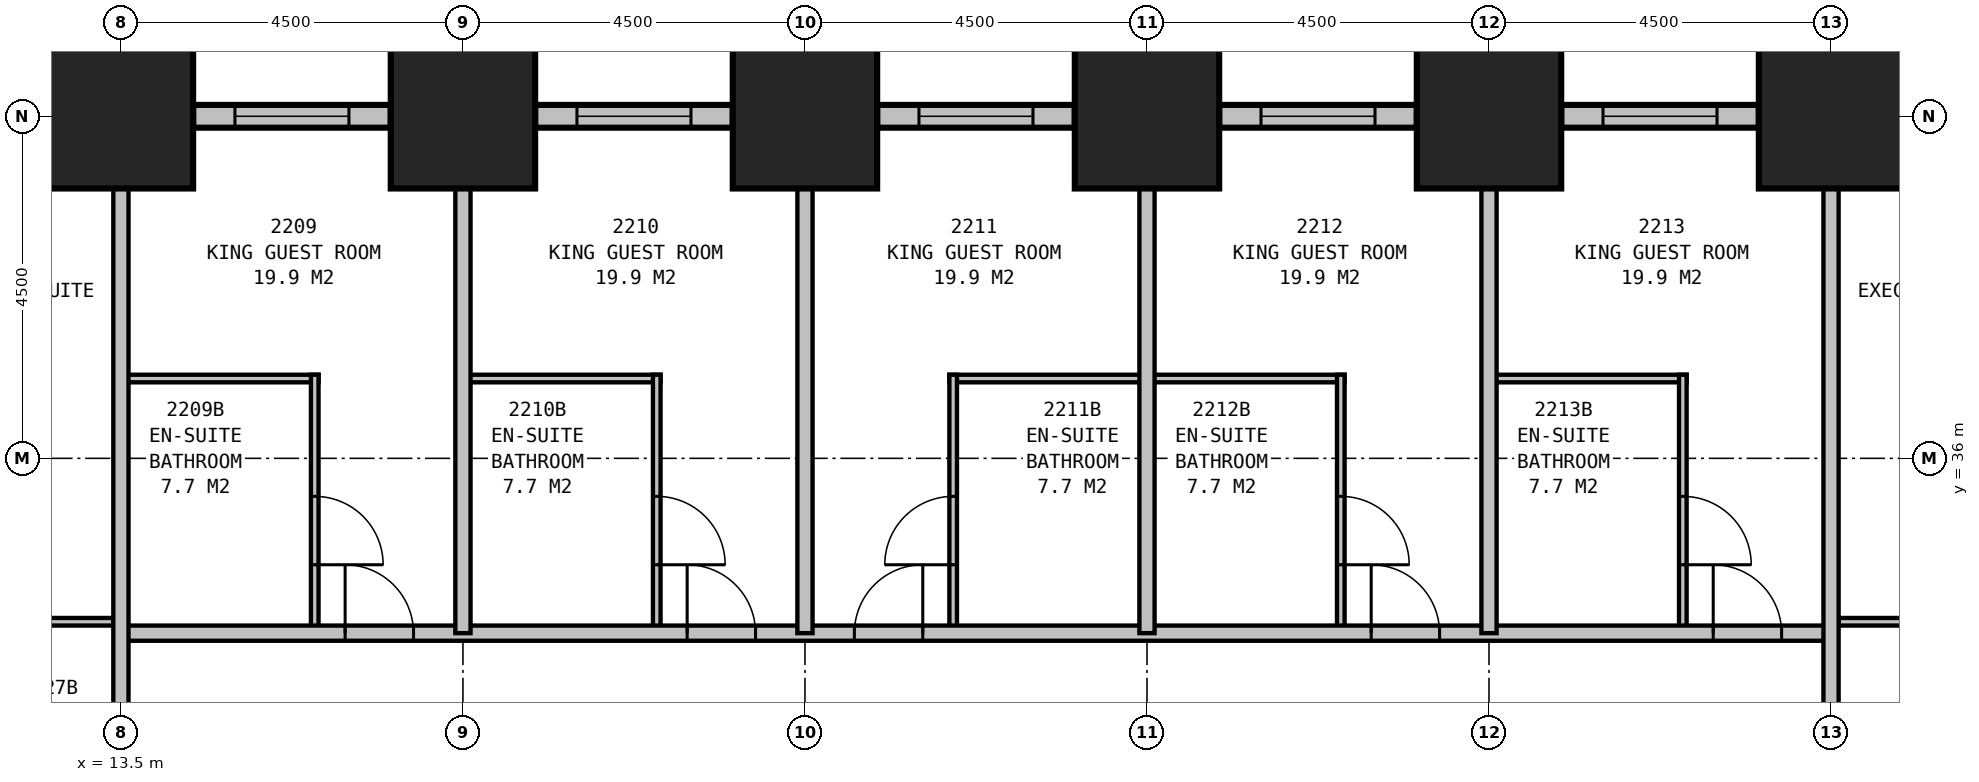
"""IFC4 building model, lengths in metres.
Left out: names, types, materials, properties, quantities, classifications, styles, units other than length and angle.
Written with IfcOpenShell. Run it as: python <this file> out.ifc"""

import sys

from ifc_helpers import new_model, si_unit, direction, frame, frame_2d, origin, origin_2d, place, context, subcontext, project, spatial, rectangle, extrude, element, fill, save


model = new_model("IFC4")
c1 = context("Model", 3, precision=1e-05, world=origin(), true_north=direction((0.0, 1.0)))
c2 = subcontext(c1, "Body", "Model", "MODEL_VIEW")
j1 = project(units=[si_unit("LENGTHUNIT", "METRE"), si_unit("PLANEANGLEUNIT", "RADIAN")], contexts=[c1])
p1 = place(None, origin())
s1 = spatial("IfcSite", under=j1, at=p1, CompositionType="ELEMENT")
p2 = place(p1, origin())
s2 = spatial("IfcBuilding", under=s1, at=p2, CompositionType="ELEMENT")
p3 = place(p2, frame((0.0, 0.0, 89.9)))
s3 = spatial("IfcBuildingStorey", under=s2, at=p3, CompositionType="ELEMENT", Elevation=89.9)
for number, where, z_axis, x_axis in (
    (1, (36.0, 40.5, 0.0), (0.0, 0.0, 1.0), (1.0, 0.0, 0.0)),
    (2, (31.5, 40.5, 0.0), (0.0, 0.0, 1.0), (1.0, 0.0, 0.0)),
    (3, (27.0, 40.5, 0.0), (0.0, 0.0, 1.0), (1.0, 0.0, 0.0)),
    (4, (22.5, 40.5, 0.0), (0.0, 0.0, 1.0), (1.0, 0.0, 0.0)),
    (5, (18.0, 40.5, 0.0), (0.0, 0.0, 1.0), (1.0, 0.0, 0.0)),
    (6, (13.5, 40.5, 0.0), (0.0, 0.0, 1.0), (1.0, 0.0, 0.0)),
):
    element("IfcColumn", number, at=place(p3, frame(where, z_axis=z_axis, x_axis=x_axis)), inside=s3, PredefinedType="COLUMN", context=c2, shape_type="SweptSolid", body=[
        extrude(rectangle(XDim=1.9, YDim=1.9, at=origin_2d()), origin(), (0.0, 0.0, 1.0), 3.5),
    ])
p4 = place(p3, frame((35.05, 40.5, 0.0), z_axis=(0.0, 0.0, 1.0), x_axis=(-1.0, 0.0, 0.0)))
e7 = element("IfcWall", 7, at=p4, inside=s3, PredefinedType="STANDARD", context=c2, shape_type="SweptSolid", body=[
    extrude(rectangle(XDim=2.6, YDim=0.3, at=frame_2d((1.3, 0.0))), origin(), (0.0, 0.0, 1.0), 2.15),
])
p5 = place(p4, frame((0.55, 0.0, 0.5)))
e8 = element("IfcOpeningElement", 8, at=p5, cuts=e7, PredefinedType="OPENING", context=c2, shape_type="SweptSolid", body=[
    extrude(rectangle(XDim=1.5, YDim=1.5, at=frame_2d((0.75, 0.75))), frame((0.0, 0.16, 0.0), z_axis=(0.0, -1.0, 0.0), x_axis=(1.0, 0.0, 0.0)), (0.0, 0.0, 1.0), 0.32),
])
p6 = place(p3, frame((30.55, 40.5, 0.0), z_axis=(0.0, 0.0, 1.0), x_axis=(-1.0, 0.0, 0.0)))
e9 = element("IfcWall", 9, at=p6, inside=s3, PredefinedType="STANDARD", context=c2, shape_type="SweptSolid", body=[
    extrude(rectangle(XDim=2.6, YDim=0.3, at=frame_2d((1.3, 0.0))), origin(), (0.0, 0.0, 1.0), 2.15),
])
p7 = place(p6, frame((0.55, 0.0, 0.5)))
e10 = element("IfcOpeningElement", 10, at=p7, cuts=e9, PredefinedType="OPENING", context=c2, shape_type="SweptSolid", body=[
    extrude(rectangle(XDim=1.5, YDim=1.5, at=frame_2d((0.75, 0.75))), frame((0.0, 0.16, 0.0), z_axis=(0.0, -1.0, 0.0), x_axis=(1.0, 0.0, 0.0)), (0.0, 0.0, 1.0), 0.32),
])
p8 = place(p3, frame((26.05, 40.5, 0.0), z_axis=(0.0, 0.0, 1.0), x_axis=(-1.0, 0.0, 0.0)))
e11 = element("IfcWall", 11, at=p8, inside=s3, PredefinedType="STANDARD", context=c2, shape_type="SweptSolid", body=[
    extrude(rectangle(XDim=2.6, YDim=0.3, at=frame_2d((1.3, 0.0))), origin(), (0.0, 0.0, 1.0), 2.15),
])
p9 = place(p8, frame((0.55, 0.0, 0.5)))
e12 = element("IfcOpeningElement", 12, at=p9, cuts=e11, PredefinedType="OPENING", context=c2, shape_type="SweptSolid", body=[
    extrude(rectangle(XDim=1.5, YDim=1.5, at=frame_2d((0.75, 0.75))), frame((0.0, 0.16, 0.0), z_axis=(0.0, -1.0, 0.0), x_axis=(1.0, 0.0, 0.0)), (0.0, 0.0, 1.0), 0.32),
])
p10 = place(p3, frame((21.55, 40.5, 0.0), z_axis=(0.0, 0.0, 1.0), x_axis=(-1.0, 0.0, 0.0)))
e13 = element("IfcWall", 13, at=p10, inside=s3, PredefinedType="STANDARD", context=c2, shape_type="SweptSolid", body=[
    extrude(rectangle(XDim=2.6, YDim=0.3, at=frame_2d((1.3, 0.0))), origin(), (0.0, 0.0, 1.0), 2.15),
])
p11 = place(p10, frame((0.55, 0.0, 0.5)))
e14 = element("IfcOpeningElement", 14, at=p11, cuts=e13, PredefinedType="OPENING", context=c2, shape_type="SweptSolid", body=[
    extrude(rectangle(XDim=1.5, YDim=1.5, at=frame_2d((0.75, 0.75))), frame((0.0, 0.16, 0.0), z_axis=(0.0, -1.0, 0.0), x_axis=(1.0, 0.0, 0.0)), (0.0, 0.0, 1.0), 0.32),
])
p12 = place(p3, frame((17.05, 40.5, 0.0), z_axis=(0.0, 0.0, 1.0), x_axis=(-1.0, 0.0, 0.0)))
e15 = element("IfcWall", 15, at=p12, inside=s3, PredefinedType="STANDARD", context=c2, shape_type="SweptSolid", body=[
    extrude(rectangle(XDim=2.6, YDim=0.3, at=frame_2d((1.3, 0.0))), origin(), (0.0, 0.0, 1.0), 2.15),
])
p13 = place(p12, frame((0.55, 0.0, 0.5)))
e16 = element("IfcOpeningElement", 16, at=p13, cuts=e15, PredefinedType="OPENING", context=c2, shape_type="SweptSolid", body=[
    extrude(rectangle(XDim=1.5, YDim=1.5, at=frame_2d((0.75, 0.75))), frame((0.0, 0.16, 0.0), z_axis=(0.0, -1.0, 0.0), x_axis=(1.0, 0.0, 0.0)), (0.0, 0.0, 1.0), 0.32),
])
p14 = place(p3, frame((13.5, 33.7, 0.0), z_axis=(0.0, 0.0, 1.0), x_axis=(1.0, 0.0, 0.0)))
e17 = element("IfcWall", 17, at=p14, inside=s3, PredefinedType="PARTITIONING", context=c2, shape_type="SweptSolid", body=[
    extrude(rectangle(XDim=22.5, YDim=0.2, at=frame_2d((11.25, 0.0))), origin(), (0.0, 0.0, 1.0), 3.25),
])
p15 = place(p14, frame((2.95, 0.0, 0.0)))
e18 = element("IfcOpeningElement", 18, at=p15, cuts=e17, PredefinedType="OPENING", context=c2, shape_type="SweptSolid", body=[
    extrude(rectangle(XDim=0.9, YDim=2.1, at=frame_2d((0.45, 1.05))), frame((0.0, 0.11, 0.0), z_axis=(0.0, -1.0, 0.0), x_axis=(1.0, 0.0, 0.0)), (0.0, 0.0, 1.0), 0.22),
])
p16 = place(p14, frame((7.45, 0.0, 0.0)))
e19 = element("IfcOpeningElement", 19, at=p16, cuts=e17, PredefinedType="OPENING", context=c2, shape_type="SweptSolid", body=[
    extrude(rectangle(XDim=0.9, YDim=2.1, at=frame_2d((0.45, 1.05))), frame((0.0, 0.11, 0.0), z_axis=(0.0, -1.0, 0.0), x_axis=(1.0, 0.0, 0.0)), (0.0, 0.0, 1.0), 0.22),
])
p17 = place(p14, frame((9.65, 0.0, 0.0)))
e20 = element("IfcOpeningElement", 20, at=p17, cuts=e17, PredefinedType="OPENING", context=c2, shape_type="SweptSolid", body=[
    extrude(rectangle(XDim=0.9, YDim=2.1, at=frame_2d((0.45, 1.05))), frame((0.0, 0.11, 0.0), z_axis=(0.0, -1.0, 0.0), x_axis=(1.0, 0.0, 0.0)), (0.0, 0.0, 1.0), 0.22),
])
p18 = place(p14, frame((16.45, 0.0, 0.0)))
e21 = element("IfcOpeningElement", 21, at=p18, cuts=e17, PredefinedType="OPENING", context=c2, shape_type="SweptSolid", body=[
    extrude(rectangle(XDim=0.9, YDim=2.1, at=frame_2d((0.45, 1.05))), frame((0.0, 0.11, 0.0), z_axis=(0.0, -1.0, 0.0), x_axis=(1.0, 0.0, 0.0)), (0.0, 0.0, 1.0), 0.22),
])
p19 = place(p14, frame((20.95, 0.0, 0.0)))
e22 = element("IfcOpeningElement", 22, at=p19, cuts=e17, PredefinedType="OPENING", context=c2, shape_type="SweptSolid", body=[
    extrude(rectangle(XDim=0.9, YDim=2.1, at=frame_2d((0.45, 1.05))), frame((0.0, 0.11, 0.0), z_axis=(0.0, -1.0, 0.0), x_axis=(1.0, 0.0, 0.0)), (0.0, 0.0, 1.0), 0.22),
])
for number, where, z_axis, x_axis in (
    (23, (18.0, 33.7, 0.0), (0.0, 0.0, 1.0), (0.0, 1.0, 0.0)),
    (24, (22.5, 33.7, 0.0), (0.0, 0.0, 1.0), (0.0, 1.0, 0.0)),
    (25, (27.0, 33.7, 0.0), (0.0, 0.0, 1.0), (0.0, 1.0, 0.0)),
    (26, (31.5, 33.7, 0.0), (0.0, 0.0, 1.0), (0.0, 1.0, 0.0)),
):
    element("IfcWall", number, at=place(p3, frame(where, z_axis=z_axis, x_axis=x_axis)), inside=s3, PredefinedType="PARTITIONING", context=c2, shape_type="SweptSolid", body=[
        extrude(rectangle(XDim=6.8, YDim=0.2, at=frame_2d((3.4, 0.0))), origin(), (0.0, 0.0, 1.0), 2.25),
    ])
p20 = place(p3, frame((13.5, 37.05, 0.0), z_axis=(0.0, 0.0, 1.0), x_axis=(1.0, 0.0, 0.0)))
e27 = element("IfcWall", 27, at=p20, inside=s3, PredefinedType="PLUMBINGWALL", context=c2, shape_type="SweptSolid", body=[
    extrude(rectangle(XDim=2.6, YDim=0.1, at=frame_2d((1.3, 0.0))), origin(), (0.0, 0.0, 1.0), 3.25),
])
p21 = place(p3, frame((16.05, 33.7, 0.0), z_axis=(0.0, 0.0, 1.0), x_axis=(0.0, 1.0, 0.0)))
e28 = element("IfcWall", 28, at=p21, inside=s3, PredefinedType="PLUMBINGWALL", context=c2, shape_type="SweptSolid", body=[
    extrude(rectangle(XDim=3.4, YDim=0.1, at=frame_2d((1.7, 0.0))), origin(), (0.0, 0.0, 1.0), 3.25),
])
p22 = place(p21, frame((1.8, 0.0, 0.0), z_axis=(0.0, 0.0, 1.0), x_axis=(-1.0, 0.0, 0.0)))
e29 = element("IfcOpeningElement", 29, at=p22, cuts=e28, PredefinedType="OPENING", context=c2, shape_type="SweptSolid", body=[
    extrude(rectangle(XDim=0.9, YDim=2.1, at=frame_2d((0.45, 1.05))), frame((0.0, 0.06, 0.0), z_axis=(0.0, -1.0, 0.0), x_axis=(1.0, 0.0, 0.0)), (0.0, 0.0, 1.0), 0.12),
])
p23 = place(p3, frame((18.0, 37.05, 0.0), z_axis=(0.0, 0.0, 1.0), x_axis=(1.0, 0.0, 0.0)))
e30 = element("IfcWall", 30, at=p23, inside=s3, PredefinedType="PLUMBINGWALL", context=c2, shape_type="SweptSolid", body=[
    extrude(rectangle(XDim=2.6, YDim=0.1, at=frame_2d((1.3, 0.0))), origin(), (0.0, 0.0, 1.0), 3.25),
])
p24 = place(p3, frame((20.55, 33.7, 0.0), z_axis=(0.0, 0.0, 1.0), x_axis=(0.0, 1.0, 0.0)))
e31 = element("IfcWall", 31, at=p24, inside=s3, PredefinedType="PLUMBINGWALL", context=c2, shape_type="SweptSolid", body=[
    extrude(rectangle(XDim=3.4, YDim=0.1, at=frame_2d((1.7, 0.0))), origin(), (0.0, 0.0, 1.0), 3.25),
])
p25 = place(p24, frame((1.8, 0.0, 0.0), z_axis=(0.0, 0.0, 1.0), x_axis=(-1.0, 0.0, 0.0)))
e32 = element("IfcOpeningElement", 32, at=p25, cuts=e31, PredefinedType="OPENING", context=c2, shape_type="SweptSolid", body=[
    extrude(rectangle(XDim=0.9, YDim=2.1, at=frame_2d((0.45, 1.05))), frame((0.0, 0.06, 0.0), z_axis=(0.0, -1.0, 0.0), x_axis=(1.0, 0.0, 0.0)), (0.0, 0.0, 1.0), 0.12),
])
p26 = place(p3, frame((24.4, 37.05, 0.0), z_axis=(0.0, 0.0, 1.0), x_axis=(1.0, 0.0, 0.0)))
e33 = element("IfcWall", 33, at=p26, inside=s3, PredefinedType="PLUMBINGWALL", context=c2, shape_type="SweptSolid", body=[
    extrude(rectangle(XDim=2.6, YDim=0.1, at=frame_2d((1.3, 0.0))), origin(), (0.0, 0.0, 1.0), 3.25),
])
p27 = place(p3, frame((24.45, 33.7, 0.0), z_axis=(0.0, 0.0, 1.0), x_axis=(0.0, 1.0, 0.0)))
e34 = element("IfcWall", 34, at=p27, inside=s3, PredefinedType="PLUMBINGWALL", context=c2, shape_type="SweptSolid", body=[
    extrude(rectangle(XDim=3.4, YDim=0.1, at=frame_2d((1.7, 0.0))), origin(), (0.0, 0.0, 1.0), 3.25),
])
p28 = place(p27, frame((0.9, 0.0, 0.0)))
e35 = element("IfcOpeningElement", 35, at=p28, cuts=e34, PredefinedType="OPENING", context=c2, shape_type="SweptSolid", body=[
    extrude(rectangle(XDim=0.9, YDim=2.1, at=frame_2d((0.45, 1.05))), frame((0.0, 0.06, 0.0), z_axis=(0.0, -1.0, 0.0), x_axis=(1.0, 0.0, 0.0)), (0.0, 0.0, 1.0), 0.12),
])
p29 = place(p3, frame((27.0, 37.05, 0.0), z_axis=(0.0, 0.0, 1.0), x_axis=(1.0, 0.0, 0.0)))
e36 = element("IfcWall", 36, at=p29, inside=s3, PredefinedType="PLUMBINGWALL", context=c2, shape_type="SweptSolid", body=[
    extrude(rectangle(XDim=2.6, YDim=0.1, at=frame_2d((1.3, 0.0))), origin(), (0.0, 0.0, 1.0), 3.25),
])
p30 = place(p3, frame((29.55, 33.7, 0.0), z_axis=(0.0, 0.0, 1.0), x_axis=(0.0, 1.0, 0.0)))
e37 = element("IfcWall", 37, at=p30, inside=s3, PredefinedType="PLUMBINGWALL", context=c2, shape_type="SweptSolid", body=[
    extrude(rectangle(XDim=3.4, YDim=0.1, at=frame_2d((1.7, 0.0))), origin(), (0.0, 0.0, 1.0), 3.25),
])
p31 = place(p30, frame((1.8, 0.0, 0.0), z_axis=(0.0, 0.0, 1.0), x_axis=(-1.0, 0.0, 0.0)))
e38 = element("IfcOpeningElement", 38, at=p31, cuts=e37, PredefinedType="OPENING", context=c2, shape_type="SweptSolid", body=[
    extrude(rectangle(XDim=0.9, YDim=2.1, at=frame_2d((0.45, 1.05))), frame((0.0, 0.06, 0.0), z_axis=(0.0, -1.0, 0.0), x_axis=(1.0, 0.0, 0.0)), (0.0, 0.0, 1.0), 0.12),
])
p32 = place(p3, frame((31.5, 37.05, 0.0), z_axis=(0.0, 0.0, 1.0), x_axis=(1.0, 0.0, 0.0)))
e39 = element("IfcWall", 39, at=p32, inside=s3, PredefinedType="PLUMBINGWALL", context=c2, shape_type="SweptSolid", body=[
    extrude(rectangle(XDim=2.6, YDim=0.1, at=frame_2d((1.3, 0.0))), origin(), (0.0, 0.0, 1.0), 3.25),
])
p33 = place(p3, frame((34.05, 33.7, 0.0), z_axis=(0.0, 0.0, 1.0), x_axis=(0.0, 1.0, 0.0)))
e40 = element("IfcWall", 40, at=p33, inside=s3, PredefinedType="PLUMBINGWALL", context=c2, shape_type="SweptSolid", body=[
    extrude(rectangle(XDim=3.4, YDim=0.1, at=frame_2d((1.7, 0.0))), origin(), (0.0, 0.0, 1.0), 3.25),
])
p34 = place(p33, frame((1.8, 0.0, 0.0), z_axis=(0.0, 0.0, 1.0), x_axis=(-1.0, 0.0, 0.0)))
e41 = element("IfcOpeningElement", 41, at=p34, cuts=e40, PredefinedType="OPENING", context=c2, shape_type="SweptSolid", body=[
    extrude(rectangle(XDim=0.9, YDim=2.1, at=frame_2d((0.45, 1.05))), frame((0.0, 0.06, 0.0), z_axis=(0.0, -1.0, 0.0), x_axis=(1.0, 0.0, 0.0)), (0.0, 0.0, 1.0), 0.12),
])
p35 = place(p3, frame((36.0, 29.9, 0.0), z_axis=(0.0, 0.0, 1.0), x_axis=(0.0, 1.0, 0.0)))
e42 = element("IfcWall", 42, at=p35, inside=s3, PredefinedType="PARTITIONING", context=c2, shape_type="SweptSolid", body=[
    extrude(rectangle(XDim=10.6, YDim=0.2, at=frame_2d((5.3, 0.0))), origin(), (0.0, 0.0, 1.0), 2.25),
])
p36 = place(p3, frame((36.1, 33.85, 0.0), z_axis=(0.0, 0.0, 1.0), x_axis=(1.0, 0.0, 0.0)))
e43 = element("IfcWall", 43, at=p36, inside=s3, PredefinedType="PLUMBINGWALL", context=c2, shape_type="SweptSolid", body=[
    extrude(rectangle(XDim=3.3, YDim=0.1, at=frame_2d((1.65, 0.0))), origin(), (0.0, 0.0, 1.0), 3.25),
])
p37 = place(p36, frame((0.9, 0.0, 0.0)))
e44 = element("IfcOpeningElement", 44, at=p37, cuts=e43, PredefinedType="OPENING", context=c2, shape_type="SweptSolid", body=[
    extrude(rectangle(XDim=0.9, YDim=2.1, at=frame_2d((0.45, 1.05))), frame((0.0, 0.06, 0.0), z_axis=(0.0, -1.0, 0.0), x_axis=(1.0, 0.0, 0.0)), (0.0, 0.0, 1.0), 0.12),
])
p38 = place(p3, frame((13.5, 29.9, 0.0), z_axis=(0.0, 0.0, 1.0), x_axis=(0.0, 1.0, 0.0)))
e45 = element("IfcWall", 45, at=p38, inside=s3, PredefinedType="PARTITIONING", context=c2, shape_type="SweptSolid", body=[
    extrude(rectangle(XDim=10.6, YDim=0.2, at=frame_2d((5.3, 0.0))), origin(), (0.0, 0.0, 1.0), 2.25),
])
p39 = place(p3, frame((13.4, 33.85, 0.0), z_axis=(0.0, 0.0, 1.0), x_axis=(-1.0, 0.0, 0.0)))
e46 = element("IfcWall", 46, at=p39, inside=s3, PredefinedType="PLUMBINGWALL", context=c2, shape_type="SweptSolid", body=[
    extrude(rectangle(XDim=3.3, YDim=0.1, at=frame_2d((1.65, 0.0))), origin(), (0.0, 0.0, 1.0), 3.25),
])
p40 = place(p39, frame((1.8, 0.0, 0.0), z_axis=(0.0, 0.0, 1.0), x_axis=(-1.0, 0.0, 0.0)))
e47 = element("IfcOpeningElement", 47, at=p40, cuts=e46, PredefinedType="OPENING", context=c2, shape_type="SweptSolid", body=[
    extrude(rectangle(XDim=0.9, YDim=2.1, at=frame_2d((0.45, 1.05))), frame((0.0, 0.06, 0.0), z_axis=(0.0, -1.0, 0.0), x_axis=(1.0, 0.0, 0.0)), (0.0, 0.0, 1.0), 0.12),
])
p41 = place(p5, origin())
e48 = element("IfcWindow", 48, at=p41, inside=s3, PartitioningType="SINGLE_PANEL", PredefinedType="WINDOW", context=c2, shape_type="SweptSolid", body=[
    extrude(rectangle(XDim=1.5, YDim=1.5, at=frame_2d((0.75, 0.75))), frame((0.0, 0.03, 0.0), z_axis=(0.0, -1.0, 0.0), x_axis=(1.0, 0.0, 0.0)), (0.0, 0.0, 1.0), 0.06),
])
fill(e8, e48)
p42 = place(p7, origin())
e49 = element("IfcWindow", 49, at=p42, inside=s3, PartitioningType="SINGLE_PANEL", PredefinedType="WINDOW", context=c2, shape_type="SweptSolid", body=[
    extrude(rectangle(XDim=1.5, YDim=1.5, at=frame_2d((0.75, 0.75))), frame((0.0, 0.03, 0.0), z_axis=(0.0, -1.0, 0.0), x_axis=(1.0, 0.0, 0.0)), (0.0, 0.0, 1.0), 0.06),
])
fill(e10, e49)
p43 = place(p9, origin())
e50 = element("IfcWindow", 50, at=p43, inside=s3, PartitioningType="SINGLE_PANEL", PredefinedType="WINDOW", context=c2, shape_type="SweptSolid", body=[
    extrude(rectangle(XDim=1.5, YDim=1.5, at=frame_2d((0.75, 0.75))), frame((0.0, 0.03, 0.0), z_axis=(0.0, -1.0, 0.0), x_axis=(1.0, 0.0, 0.0)), (0.0, 0.0, 1.0), 0.06),
])
fill(e12, e50)
p44 = place(p11, origin())
e51 = element("IfcWindow", 51, at=p44, inside=s3, PartitioningType="SINGLE_PANEL", PredefinedType="WINDOW", context=c2, shape_type="SweptSolid", body=[
    extrude(rectangle(XDim=1.5, YDim=1.5, at=frame_2d((0.75, 0.75))), frame((0.0, 0.03, 0.0), z_axis=(0.0, -1.0, 0.0), x_axis=(1.0, 0.0, 0.0)), (0.0, 0.0, 1.0), 0.06),
])
fill(e14, e51)
p45 = place(p13, origin())
e52 = element("IfcWindow", 52, at=p45, inside=s3, PartitioningType="SINGLE_PANEL", PredefinedType="WINDOW", context=c2, shape_type="SweptSolid", body=[
    extrude(rectangle(XDim=1.5, YDim=1.5, at=frame_2d((0.75, 0.75))), frame((0.0, 0.03, 0.0), z_axis=(0.0, -1.0, 0.0), x_axis=(1.0, 0.0, 0.0)), (0.0, 0.0, 1.0), 0.06),
])
fill(e16, e52)
p46 = place(p15, origin())
e53 = element("IfcDoor", 53, at=p46, inside=s3, OperationType="SINGLE_SWING_LEFT", PredefinedType="DOOR", context=c2, shape_type="SweptSolid", body=[
    extrude(rectangle(XDim=0.9, YDim=2.1, at=frame_2d((0.45, 1.05))), frame((0.0, 0.025, 0.0), z_axis=(0.0, -1.0, 0.0), x_axis=(1.0, 0.0, 0.0)), (0.0, 0.0, 1.0), 0.05),
])
fill(e18, e53)
p47 = place(p16, origin())
e54 = element("IfcDoor", 54, at=p47, inside=s3, OperationType="SINGLE_SWING_LEFT", PredefinedType="DOOR", context=c2, shape_type="SweptSolid", body=[
    extrude(rectangle(XDim=0.9, YDim=2.1, at=frame_2d((0.45, 1.05))), frame((0.0, 0.025, 0.0), z_axis=(0.0, -1.0, 0.0), x_axis=(1.0, 0.0, 0.0)), (0.0, 0.0, 1.0), 0.05),
])
fill(e19, e54)
p48 = place(p17, origin())
e55 = element("IfcDoor", 55, at=p48, inside=s3, OperationType="SINGLE_SWING_RIGHT", PredefinedType="DOOR", context=c2, shape_type="SweptSolid", body=[
    extrude(rectangle(XDim=0.9, YDim=2.1, at=frame_2d((0.45, 1.05))), frame((0.0, 0.025, 0.0), z_axis=(0.0, -1.0, 0.0), x_axis=(1.0, 0.0, 0.0)), (0.0, 0.0, 1.0), 0.05),
])
fill(e20, e55)
p49 = place(p18, origin())
e56 = element("IfcDoor", 56, at=p49, inside=s3, OperationType="SINGLE_SWING_LEFT", PredefinedType="DOOR", context=c2, shape_type="SweptSolid", body=[
    extrude(rectangle(XDim=0.9, YDim=2.1, at=frame_2d((0.45, 1.05))), frame((0.0, 0.025, 0.0), z_axis=(0.0, -1.0, 0.0), x_axis=(1.0, 0.0, 0.0)), (0.0, 0.0, 1.0), 0.05),
])
fill(e21, e56)
p50 = place(p19, origin())
e57 = element("IfcDoor", 57, at=p50, inside=s3, OperationType="SINGLE_SWING_LEFT", PredefinedType="DOOR", context=c2, shape_type="SweptSolid", body=[
    extrude(rectangle(XDim=0.9, YDim=2.1, at=frame_2d((0.45, 1.05))), frame((0.0, 0.025, 0.0), z_axis=(0.0, -1.0, 0.0), x_axis=(1.0, 0.0, 0.0)), (0.0, 0.0, 1.0), 0.05),
])
fill(e22, e57)
p51 = place(p22, origin())
e58 = element("IfcDoor", 58, at=p51, inside=s3, OperationType="SINGLE_SWING_RIGHT", PredefinedType="DOOR", context=c2, shape_type="SweptSolid", body=[
    extrude(rectangle(XDim=0.9, YDim=2.1, at=frame_2d((0.45, 1.05))), frame((0.0, 0.025, 0.0), z_axis=(0.0, -1.0, 0.0), x_axis=(1.0, 0.0, 0.0)), (0.0, 0.0, 1.0), 0.05),
])
fill(e29, e58)
p52 = place(p25, origin())
e59 = element("IfcDoor", 59, at=p52, inside=s3, OperationType="SINGLE_SWING_RIGHT", PredefinedType="DOOR", context=c2, shape_type="SweptSolid", body=[
    extrude(rectangle(XDim=0.9, YDim=2.1, at=frame_2d((0.45, 1.05))), frame((0.0, 0.025, 0.0), z_axis=(0.0, -1.0, 0.0), x_axis=(1.0, 0.0, 0.0)), (0.0, 0.0, 1.0), 0.05),
])
fill(e32, e59)
p53 = place(p28, origin())
e60 = element("IfcDoor", 60, at=p53, inside=s3, OperationType="SINGLE_SWING_LEFT", PredefinedType="DOOR", context=c2, shape_type="SweptSolid", body=[
    extrude(rectangle(XDim=0.9, YDim=2.1, at=frame_2d((0.45, 1.05))), frame((0.0, 0.025, 0.0), z_axis=(0.0, -1.0, 0.0), x_axis=(1.0, 0.0, 0.0)), (0.0, 0.0, 1.0), 0.05),
])
fill(e35, e60)
p54 = place(p31, origin())
e61 = element("IfcDoor", 61, at=p54, inside=s3, OperationType="SINGLE_SWING_RIGHT", PredefinedType="DOOR", context=c2, shape_type="SweptSolid", body=[
    extrude(rectangle(XDim=0.9, YDim=2.1, at=frame_2d((0.45, 1.05))), frame((0.0, 0.025, 0.0), z_axis=(0.0, -1.0, 0.0), x_axis=(1.0, 0.0, 0.0)), (0.0, 0.0, 1.0), 0.05),
])
fill(e38, e61)
p55 = place(p34, origin())
e62 = element("IfcDoor", 62, at=p55, inside=s3, OperationType="SINGLE_SWING_RIGHT", PredefinedType="DOOR", context=c2, shape_type="SweptSolid", body=[
    extrude(rectangle(XDim=0.9, YDim=2.1, at=frame_2d((0.45, 1.05))), frame((0.0, 0.025, 0.0), z_axis=(0.0, -1.0, 0.0), x_axis=(1.0, 0.0, 0.0)), (0.0, 0.0, 1.0), 0.05),
])
fill(e41, e62)
save(model, sys.argv[1])
